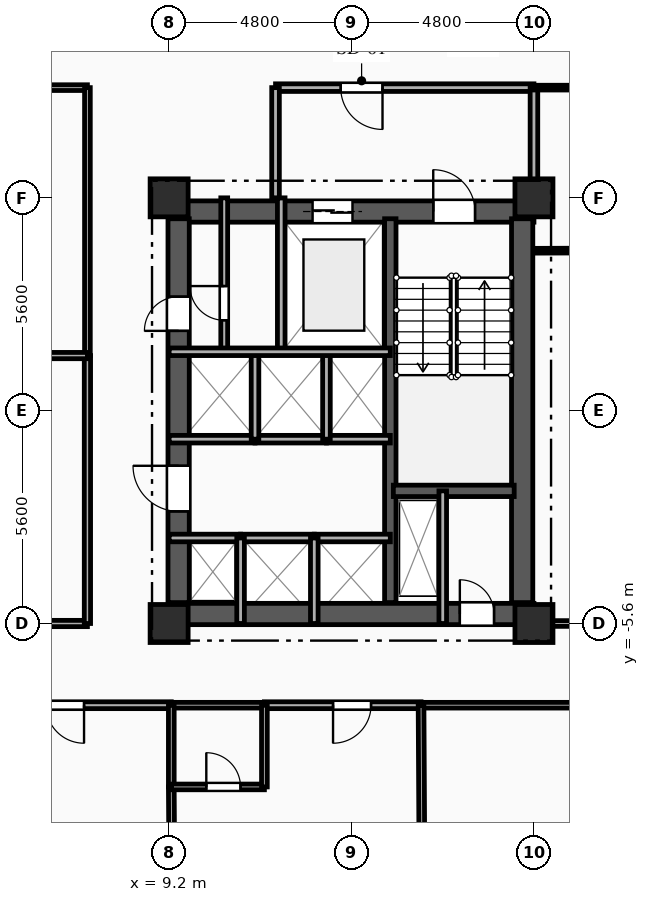
"""IFC4 building model, lengths in metres.
Left out: names, types, materials, properties, quantities, classifications, styles, units other than length and angle.
Written with IfcOpenShell. Run it as: python <this file> out.ifc"""

import sys

from ifc_helpers import new_model, si_unit, direction, frame, frame_2d, origin, origin_2d, place, context, subcontext, project, spatial, rectangle, extrude, element, fill, save


model = new_model("IFC4")
c1 = context("Model", 3, precision=1e-05, world=origin(), true_north=direction((0.0, 1.0)))
c2 = subcontext(c1, "Body", "Model", "MODEL_VIEW")
j1 = project(units=[si_unit("LENGTHUNIT", "METRE"), si_unit("PLANEANGLEUNIT", "RADIAN")], contexts=[c1])
p1 = place(None, origin())
s1 = spatial("IfcSite", under=j1, at=p1, CompositionType="ELEMENT")
p2 = place(p1, origin())
s2 = spatial("IfcBuilding", under=s1, at=p2, CompositionType="ELEMENT")
p3 = place(p2, frame((0.0, 0.0, 119.2)))
s3 = spatial("IfcBuildingStorey", under=s2, at=p3, CompositionType="ELEMENT", Elevation=119.2)
for number, where, z_axis, x_axis in (
    (1, (9.2, -5.6, 0.0), (0.0, 0.0, 1.0), (1.0, 0.0, 0.0)),
    (2, (9.2, 5.6, 0.0), (0.0, 0.0, 1.0), (1.0, 0.0, 0.0)),
    (3, (18.8, -5.6, 0.0), (0.0, 0.0, 1.0), (1.0, 0.0, 0.0)),
    (4, (18.8, 5.6, 0.0), (0.0, 0.0, 1.0), (1.0, 0.0, 0.0)),
):
    element("IfcColumn", number, at=place(p3, frame(where, z_axis=z_axis, x_axis=x_axis)), inside=s3, PredefinedType="COLUMN", context=c2, shape_type="SweptSolid", body=[
        extrude(rectangle(XDim=1.0, YDim=1.0, at=origin_2d()), origin(), (0.0, 0.0, 1.0), 3.35),
    ])
p4 = place(p3, frame((9.2, 5.24, 0.0), z_axis=(0.0, 0.0, 1.0), x_axis=(1.0, 0.0, 0.0)))
e5 = element("IfcWall", 5, at=p4, inside=s3, PredefinedType="SHEAR", context=c2, shape_type="SweptSolid", body=[
    extrude(rectangle(XDim=9.6, YDim=0.56, at=frame_2d((4.8, 0.0))), origin(), (0.0, 0.0, 1.0), 3.045),
])
p5 = place(p4, frame((6.95, 0.0, 0.0)))
e6 = element("IfcOpeningElement", 6, at=p5, cuts=e5, PredefinedType="OPENING", context=c2, shape_type="SweptSolid", body=[
    extrude(rectangle(XDim=1.1, YDim=2.15, at=frame_2d((0.55, 1.075))), frame((0.0, 0.29, 0.0), z_axis=(0.0, -1.0, 0.0), x_axis=(1.0, 0.0, 0.0)), (0.0, 0.0, 1.0), 0.58),
])
p6 = place(p4, frame((3.775, 0.0, 0.0)))
e7 = element("IfcOpeningElement", 7, at=p6, cuts=e5, PredefinedType="OPENING", context=c2, shape_type="SweptSolid", body=[
    extrude(rectangle(XDim=1.05, YDim=2.1, at=frame_2d((0.525, 1.05))), frame((0.0, 0.29, 0.0), z_axis=(0.0, -1.0, 0.0), x_axis=(1.0, 0.0, 0.0)), (0.0, 0.0, 1.0), 0.58),
])
p7 = place(p3, frame((9.2, -5.35, 0.0), z_axis=(0.0, 0.0, 1.0), x_axis=(1.0, 0.0, 0.0)))
e8 = element("IfcWall", 8, at=p7, inside=s3, PredefinedType="SHEAR", context=c2, shape_type="SweptSolid", body=[
    extrude(rectangle(XDim=9.6, YDim=0.56, at=frame_2d((4.8, 0.0))), origin(), (0.0, 0.0, 1.0), 3.045),
])
p8 = place(p7, frame((7.65, 0.0, 0.0)))
e9 = element("IfcOpeningElement", 9, at=p8, cuts=e8, PredefinedType="OPENING", context=c2, shape_type="SweptSolid", body=[
    extrude(rectangle(XDim=0.9, YDim=2.1, at=frame_2d((0.45, 1.05))), frame((0.0, 0.29, 0.0), z_axis=(0.0, -1.0, 0.0), x_axis=(1.0, 0.0, 0.0)), (0.0, 0.0, 1.0), 0.58),
])
p9 = place(p3, frame((9.45, -5.05, 0.0), z_axis=(0.0, 0.0, 1.0), x_axis=(0.0, 1.0, 0.0)))
e10 = element("IfcWall", 10, at=p9, inside=s3, PredefinedType="SHEAR", context=c2, shape_type="SweptSolid", body=[
    extrude(rectangle(XDim=10.1, YDim=0.56, at=frame_2d((5.05, 0.0))), origin(), (0.0, 0.0, 1.0), 3.045),
])
p10 = place(p9, frame((7.15, 0.0, 0.0)))
e11 = element("IfcOpeningElement", 11, at=p10, cuts=e10, PredefinedType="OPENING", context=c2, shape_type="SweptSolid", body=[
    extrude(rectangle(XDim=0.9, YDim=2.1, at=frame_2d((0.45, 1.05))), frame((0.0, 0.29, 0.0), z_axis=(0.0, -1.0, 0.0), x_axis=(1.0, 0.0, 0.0)), (0.0, 0.0, 1.0), 0.58),
])
p11 = place(p9, frame((2.4, 0.0, 0.0)))
e12 = element("IfcOpeningElement", 12, at=p11, cuts=e10, PredefinedType="OPENING", context=c2, shape_type="SweptSolid", body=[
    extrude(rectangle(XDim=1.2, YDim=2.15, at=frame_2d((0.6, 1.075))), frame((0.0, 0.29, 0.0), z_axis=(0.0, -1.0, 0.0), x_axis=(1.0, 0.0, 0.0)), (0.0, 0.0, 1.0), 0.58),
])
p12 = place(p3, frame((18.49, -5.05, 0.0), z_axis=(0.0, 0.0, 1.0), x_axis=(0.0, 1.0, 0.0)))
e13 = element("IfcWall", 13, at=p12, inside=s3, PredefinedType="SHEAR", context=c2, shape_type="SweptSolid", body=[
    extrude(rectangle(XDim=10.1, YDim=0.56, at=frame_2d((5.05, 0.0))), origin(), (0.0, 0.0, 1.0), 3.045),
])
p13 = place(p3, frame((15.02, -5.05, 0.0), z_axis=(0.0, 0.0, 1.0), x_axis=(0.0, 1.0, 0.0)))
e14 = element("IfcWall", 14, at=p13, inside=s3, PredefinedType="SHEAR", context=c2, shape_type="SweptSolid", body=[
    extrude(rectangle(XDim=10.1, YDim=0.3, at=frame_2d((5.05, 0.0))), origin(), (0.0, 0.0, 1.0), 3.045),
])
p14 = place(p3, frame((15.1, -2.11, 0.0), z_axis=(0.0, 0.0, 1.0), x_axis=(1.0, 0.0, 0.0)))
e15 = element("IfcWall", 15, at=p14, inside=s3, PredefinedType="SHEAR", context=c2, shape_type="SweptSolid", body=[
    extrude(rectangle(XDim=3.18, YDim=0.3, at=frame_2d((1.59, 0.0))), origin(), (0.0, 0.0, 1.0), 3.045),
])
p15 = place(p3, frame((16.4, -2.11, 0.0), z_axis=(0.0, 0.0, 1.0), x_axis=(0.0, -1.0, 0.0)))
e16 = element("IfcWall", 16, at=p15, inside=s3, PredefinedType="PARTITIONING", context=c2, shape_type="SweptSolid", body=[
    extrude(rectangle(XDim=3.49, YDim=0.2, at=frame_2d((1.745, 0.0))), origin(), (0.0, 0.0, 1.0), 3.045),
])
p16 = place(p3, frame((12.15, 5.6, 0.0), z_axis=(0.0, 0.0, 1.0), x_axis=(0.0, -1.0, 0.0)))
e17 = element("IfcWall", 17, at=p16, inside=s3, PredefinedType="PARTITIONING", context=c2, shape_type="SweptSolid", body=[
    extrude(rectangle(XDim=4.05, YDim=0.2, at=frame_2d((2.025, 0.0))), origin(), (0.0, 0.0, 1.0), 3.045),
])
p17 = place(p3, frame((18.8, 8.5, 0.0), z_axis=(0.0, 0.0, 1.0), x_axis=(-1.0, 0.0, 0.0)))
e18 = element("IfcWall", 18, at=p17, inside=s3, PredefinedType="PARTITIONING", context=c2, shape_type="SweptSolid", body=[
    extrude(rectangle(XDim=6.8, YDim=0.2, at=frame_2d((3.4, 0.0))), origin(), (0.0, 0.0, 1.0), 3.045),
])
p18 = place(p17, frame((3.985, 0.0, 0.0)))
e19 = element("IfcOpeningElement", 19, at=p18, cuts=e18, PredefinedType="OPENING", context=c2, shape_type="SweptSolid", body=[
    extrude(rectangle(XDim=1.1, YDim=2.15, at=frame_2d((0.55, 1.075))), frame((0.0, 0.11, 0.0), z_axis=(0.0, -1.0, 0.0), x_axis=(1.0, 0.0, 0.0)), (0.0, 0.0, 1.0), 0.22),
])
p19 = place(p3, frame((12.0, 8.5, 0.0), z_axis=(0.0, 0.0, 1.0), x_axis=(0.0, -1.0, 0.0)))
e20 = element("IfcWall", 20, at=p19, inside=s3, PredefinedType="PARTITIONING", context=c2, shape_type="SweptSolid", body=[
    extrude(rectangle(XDim=2.9, YDim=0.2, at=frame_2d((1.45, 0.0))), origin(), (0.0, 0.0, 1.0), 3.045),
])
p20 = place(p3, frame((18.8, 5.6, 0.0), z_axis=(0.0, 0.0, 1.0), x_axis=(0.0, 1.0, 0.0)))
e21 = element("IfcWall", 21, at=p20, inside=s3, PredefinedType="PARTITIONING", context=c2, shape_type="SweptSolid", body=[
    extrude(rectangle(XDim=2.9, YDim=0.2, at=frame_2d((1.45, 0.0))), origin(), (0.0, 0.0, 1.0), 2.53),
])
p21 = place(p3, frame((10.65, 1.55, 0.0), z_axis=(0.0, 0.0, 1.0), x_axis=(0.0, 1.0, 0.0)))
e22 = element("IfcWall", 22, at=p21, inside=s3, PredefinedType="PARTITIONING", context=c2, shape_type="SweptSolid", body=[
    extrude(rectangle(XDim=4.05, YDim=0.18, at=frame_2d((2.025, 0.0))), origin(), (0.0, 0.0, 1.0), 3.045),
])
p22 = place(p21, frame((0.829, 0.0, 0.0)))
e23 = element("IfcOpeningElement", 23, at=p22, cuts=e22, PredefinedType="OPENING", context=c2, shape_type="SweptSolid", body=[
    extrude(rectangle(XDim=0.9, YDim=2.1, at=frame_2d((0.45, 1.05))), frame((0.0, 0.1, 0.0), z_axis=(0.0, -1.0, 0.0), x_axis=(1.0, 0.0, 0.0)), (0.0, 0.0, 1.0), 0.2),
])
p23 = place(p3, frame((9.2, -3.35, 0.0), z_axis=(0.0, 0.0, 1.0), x_axis=(1.0, 0.0, 0.0)))
e24 = element("IfcWall", 24, at=p23, inside=s3, PredefinedType="PARTITIONING", context=c2, shape_type="SweptSolid", body=[
    extrude(rectangle(XDim=1.88, YDim=0.2, at=frame_2d((0.94, 0.0))), origin(), (0.0, 0.0, 1.0), 2.76),
])
p24 = place(p3, frame((11.08, -3.35, 0.0), z_axis=(0.0, 0.0, 1.0), x_axis=(1.0, 0.0, 0.0)))
e25 = element("IfcWall", 25, at=p24, inside=s3, PredefinedType="PARTITIONING", context=c2, shape_type="SweptSolid", body=[
    extrude(rectangle(XDim=1.94, YDim=0.2, at=frame_2d((0.97, 0.0))), origin(), (0.0, 0.0, 1.0), 3.045),
])
p25 = place(p3, frame((13.02, -3.35, 0.0), z_axis=(0.0, 0.0, 1.0), x_axis=(1.0, 0.0, 0.0)))
e26 = element("IfcWall", 26, at=p25, inside=s3, PredefinedType="PARTITIONING", context=c2, shape_type="SweptSolid", body=[
    extrude(rectangle(XDim=2.0, YDim=0.2, at=frame_2d((1.0, 0.0))), origin(), (0.0, 0.0, 1.0), 3.045),
])
p26 = place(p3, frame((11.46, -0.75, 0.0), z_axis=(0.0, 0.0, 1.0), x_axis=(-1.0, 0.0, 0.0)))
e27 = element("IfcWall", 27, at=p26, inside=s3, PredefinedType="PARTITIONING", context=c2, shape_type="SweptSolid", body=[
    extrude(rectangle(XDim=2.26, YDim=0.2, at=frame_2d((1.13, 0.0))), origin(), (0.0, 0.0, 1.0), 3.045),
])
p27 = place(p3, frame((13.34, -0.75, 0.0), z_axis=(0.0, 0.0, 1.0), x_axis=(-1.0, 0.0, 0.0)))
e28 = element("IfcWall", 28, at=p27, inside=s3, PredefinedType="PARTITIONING", context=c2, shape_type="SweptSolid", body=[
    extrude(rectangle(XDim=1.88, YDim=0.2, at=frame_2d((0.94, 0.0))), origin(), (0.0, 0.0, 1.0), 3.045),
])
p28 = place(p3, frame((15.02, -0.75, 0.0), z_axis=(0.0, 0.0, 1.0), x_axis=(-1.0, 0.0, 0.0)))
e29 = element("IfcWall", 29, at=p28, inside=s3, PredefinedType="PARTITIONING", context=c2, shape_type="SweptSolid", body=[
    extrude(rectangle(XDim=1.68, YDim=0.2, at=frame_2d((0.84, 0.0))), origin(), (0.0, 0.0, 1.0), 3.045),
])
for number, where, z_axis, x_axis in (
    (30, (11.08, -5.6, 0.0), (0.0, 0.0, 1.0), (0.0, 1.0, 0.0)),
    (31, (13.02, -5.6, 0.0), (0.0, 0.0, 1.0), (0.0, 1.0, 0.0)),
):
    element("IfcWall", number, at=place(p3, frame(where, z_axis=z_axis, x_axis=x_axis)), inside=s3, PredefinedType="PARTITIONING", context=c2, shape_type="SweptSolid", body=[
        extrude(rectangle(XDim=2.25, YDim=0.2, at=frame_2d((1.125, 0.0))), origin(), (0.0, 0.0, 1.0), 3.045),
    ])
for number, where, z_axis, x_axis in (
    (32, (11.46, -0.75, 0.0), (0.0, 0.0, 1.0), (0.0, 1.0, 0.0)),
    (33, (13.34, -0.75, 0.0), (0.0, 0.0, 1.0), (0.0, 1.0, 0.0)),
):
    element("IfcWall", number, at=place(p3, frame(where, z_axis=z_axis, x_axis=x_axis)), inside=s3, PredefinedType="PARTITIONING", context=c2, shape_type="SweptSolid", body=[
        extrude(rectangle(XDim=2.3, YDim=0.2, at=frame_2d((1.15, 0.0))), origin(), (0.0, 0.0, 1.0), 3.045),
    ])
p29 = place(p3, frame((23.0, 8.5, 0.0), z_axis=(0.0, 0.0, 1.0), x_axis=(-1.0, 0.0, 0.0)))
e34 = element("IfcWall", 34, at=p29, inside=s3, PredefinedType="PARTITIONING", context=c2, shape_type="SweptSolid", body=[
    extrude(rectangle(XDim=4.2, YDim=0.125, at=frame_2d((2.1, 0.0))), origin(), (0.0, 0.0, 1.0), 3.045),
])
p30 = place(p29, frame((0.841, 0.0, 0.0)))
e35 = element("IfcOpeningElement", 35, at=p30, cuts=e34, PredefinedType="OPENING", context=c2, shape_type="SweptSolid", body=[
    extrude(rectangle(XDim=0.95, YDim=2.1, at=frame_2d((0.475, 1.05))), frame((0.0, 0.073, 0.0), z_axis=(0.0, -1.0, 0.0), x_axis=(1.0, 0.0, 0.0)), (0.0, 0.0, 1.0), 0.145),
])
p31 = place(p3, frame((7.05, 8.5, 0.0), z_axis=(0.0, 0.0, 1.0), x_axis=(-1.0, 0.0, 0.0)))
e36 = element("IfcWall", 36, at=p31, inside=s3, PredefinedType="PARTITIONING", context=c2, shape_type="SweptSolid", body=[
    extrude(rectangle(XDim=7.05, YDim=0.15, at=frame_2d((3.525, 0.0))), origin(), (0.0, 0.0, 1.0), 3.045),
])
p32 = place(p3, frame((18.8, -5.6, 0.0), z_axis=(0.0, 0.0, 1.0), x_axis=(1.0, 0.0, 0.0)))
e37 = element("IfcWall", 37, at=p32, inside=s3, PredefinedType="PARTITIONING", context=c2, shape_type="SweptSolid", body=[
    extrude(rectangle(XDim=4.2, YDim=0.15, at=frame_2d((2.1, 0.0))), origin(), (0.0, 0.0, 1.0), 2.53),
])
p33 = place(p32, frame((2.321, 0.0, 0.0)))
e38 = element("IfcOpeningElement", 38, at=p33, cuts=e37, PredefinedType="OPENING", context=c2, shape_type="SweptSolid", body=[
    extrude(rectangle(XDim=1.05, YDim=2.15, at=frame_2d((0.525, 1.075))), frame((0.0, 0.085, 0.0), z_axis=(0.0, -1.0, 0.0), x_axis=(1.0, 0.0, 0.0)), (0.0, 0.0, 1.0), 0.17),
])
p34 = place(p3, frame((9.257, -7.75, 0.0), z_axis=(0.0, 0.0, 1.0), x_axis=(-1.0, 0.0, 0.0)))
e39 = element("IfcWall", 39, at=p34, inside=s3, PredefinedType="PARTITIONING", context=c2, shape_type="SweptSolid", body=[
    extrude(rectangle(XDim=4.121, YDim=0.18, at=frame_2d((2.061, 0.0))), origin(), (0.0, 0.0, 1.0), 3.045),
])
p35 = place(p34, frame((2.296, 0.0, 0.0)))
e40 = element("IfcOpeningElement", 40, at=p35, cuts=e39, PredefinedType="OPENING", context=c2, shape_type="SweptSolid", body=[
    extrude(rectangle(XDim=1.0, YDim=2.15, at=frame_2d((0.5, 1.075))), frame((0.0, 0.1, 0.0), z_axis=(0.0, -1.0, 0.0), x_axis=(1.0, 0.0, 0.0)), (0.0, 0.0, 1.0), 0.2),
])
p36 = place(p3, frame((15.829, -7.75, 0.0), z_axis=(0.0, 0.0, 1.0), x_axis=(-1.0, 0.0, 0.0)))
e41 = element("IfcWall", 41, at=p36, inside=s3, PredefinedType="PARTITIONING", context=c2, shape_type="SweptSolid", body=[
    extrude(rectangle(XDim=4.122, YDim=0.18, at=frame_2d((2.061, 0.0))), origin(), (0.0, 0.0, 1.0), 3.045),
])
p37 = place(p36, frame((1.316, 0.0, 0.0)))
e42 = element("IfcOpeningElement", 42, at=p37, cuts=e41, PredefinedType="OPENING", context=c2, shape_type="SweptSolid", body=[
    extrude(rectangle(XDim=1.0, YDim=2.15, at=frame_2d((0.5, 1.075))), frame((0.0, 0.1, 0.0), z_axis=(0.0, -1.0, 0.0), x_axis=(1.0, 0.0, 0.0)), (0.0, 0.0, 1.0), 0.2),
])
p38 = place(p3, frame((11.707, -7.75, 0.0), z_axis=(0.0, 0.0, 1.0), x_axis=(-1.0, 0.0, 0.0)))
e43 = element("IfcWall", 43, at=p38, inside=s3, PredefinedType="PLUMBINGWALL", context=c2, shape_type="SweptSolid", body=[
    extrude(rectangle(XDim=2.45, YDim=0.15, at=frame_2d((1.225, 0.0))), origin(), (0.0, 0.0, 1.0), 3.045),
])
p39 = place(p3, frame((23.0, -7.75, 0.0), z_axis=(0.0, 0.0, 1.0), x_axis=(-1.0, 0.0, 0.0)))
e44 = element("IfcWall", 44, at=p39, inside=s3, PredefinedType="PARTITIONING", context=c2, shape_type="SweptSolid", body=[
    extrude(rectangle(XDim=7.171, YDim=0.15, at=frame_2d((3.585, 0.0))), origin(), (0.0, 0.0, 1.0), 3.045),
])
p40 = place(p39, frame((1.2, 0.0, 0.0)))
e45 = element("IfcOpeningElement", 45, at=p40, cuts=e44, PredefinedType="OPENING", context=c2, shape_type="SweptSolid", body=[
    extrude(rectangle(XDim=1.05, YDim=2.15, at=frame_2d((0.525, 1.075))), frame((0.0, 0.085, 0.0), z_axis=(0.0, -1.0, 0.0), x_axis=(1.0, 0.0, 0.0)), (0.0, 0.0, 1.0), 0.17),
])
p41 = place(p3, frame((0.0, -5.6, 0.0), z_axis=(0.0, 0.0, 1.0), x_axis=(1.0, 0.0, 0.0)))
e46 = element("IfcWall", 46, at=p41, inside=s3, PredefinedType="PARTITIONING", context=c2, shape_type="SweptSolid", body=[
    extrude(rectangle(XDim=7.05, YDim=0.165, at=frame_2d((3.525, 0.0))), origin(), (0.0, 0.0, 1.0), 2.53),
])
p42 = place(p3, frame((7.05, -5.6, 0.0), z_axis=(0.0, 0.0, 1.0), x_axis=(0.0, 1.0, 0.0)))
e47 = element("IfcWall", 47, at=p42, inside=s3, PredefinedType="PARTITIONING", context=c2, shape_type="SweptSolid", body=[
    extrude(rectangle(XDim=7.05, YDim=0.165, at=frame_2d((3.525, 0.0))), origin(), (0.0, 0.0, 1.0), 3.045),
])
p43 = place(p3, frame((7.05, 1.45, 0.0), z_axis=(0.0, 0.0, 1.0), x_axis=(0.0, 1.0, 0.0)))
e48 = element("IfcWall", 48, at=p43, inside=s3, PredefinedType="PARTITIONING", context=c2, shape_type="SweptSolid", body=[
    extrude(rectangle(XDim=7.05, YDim=0.15, at=frame_2d((3.525, 0.0))), origin(), (0.0, 0.0, 1.0), 3.045),
])
p44 = place(p3, frame((18.8, 4.208, 0.0), z_axis=(0.0, 0.0, 1.0), x_axis=(0.9999942944, 0.003378042094, 0.0)))
e49 = element("IfcWall", 49, at=p44, inside=s3, PredefinedType="PARTITIONING", context=c2, shape_type="SweptSolid", body=[
    extrude(rectangle(XDim=13.009, YDim=0.125, at=frame_2d((6.504, 0.0))), origin(), (0.0, 0.0, 1.0), 3.045),
])
p45 = place(p3, frame((9.257, -9.9, 0.0), z_axis=(0.0, 0.0, 1.0), x_axis=(0.006943468909, -0.999975893829, 0.0)))
e50 = element("IfcWall", 50, at=p45, inside=s3, PredefinedType="PARTITIONING", context=c2, shape_type="SweptSolid", body=[
    extrude(rectangle(XDim=6.294, YDim=0.15, at=frame_2d((3.147, 0.0))), origin(), (0.0, 0.0, 1.0), 3.045),
])
p46 = place(p3, frame((9.257, -7.75, 0.0), z_axis=(0.0, 0.0, 1.0), x_axis=(0.0, -1.0, 0.0)))
e51 = element("IfcWall", 51, at=p46, inside=s3, PredefinedType="PLUMBINGWALL", context=c2, shape_type="SweptSolid", body=[
    extrude(rectangle(XDim=2.15, YDim=0.15, at=frame_2d((1.075, 0.0))), origin(), (0.0, 0.0, 1.0), 3.045),
])
p47 = place(p3, frame((9.257, -9.9, 0.0), z_axis=(0.0, 0.0, 1.0), x_axis=(1.0, 0.0, 0.0)))
e52 = element("IfcWall", 52, at=p47, inside=s3, PredefinedType="PLUMBINGWALL", context=c2, shape_type="SweptSolid", body=[
    extrude(rectangle(XDim=2.45, YDim=0.15, at=frame_2d((1.225, 0.0))), origin(), (0.0, 0.0, 1.0), 3.045),
])
p48 = place(p47, frame((0.921, 0.0, 0.0)))
e53 = element("IfcOpeningElement", 53, at=p48, cuts=e52, PredefinedType="OPENING", context=c2, shape_type="SweptSolid", body=[
    extrude(rectangle(XDim=0.9, YDim=2.1, at=frame_2d((0.45, 1.05))), frame((0.0, 0.085, 0.0), z_axis=(0.0, -1.0, 0.0), x_axis=(1.0, 0.0, 0.0)), (0.0, 0.0, 1.0), 0.17),
])
p49 = place(p3, frame((11.707, -9.9, 0.0), z_axis=(0.0, 0.0, 1.0), x_axis=(0.0, 1.0, 0.0)))
e54 = element("IfcWall", 54, at=p49, inside=s3, PredefinedType="PLUMBINGWALL", context=c2, shape_type="SweptSolid", body=[
    extrude(rectangle(XDim=2.15, YDim=0.15, at=frame_2d((1.075, 0.0))), origin(), (0.0, 0.0, 1.0), 3.045),
])
p50 = place(p3, frame((15.829, -7.75, 0.0), z_axis=(0.0, 0.0, 1.0), x_axis=(0.00563681802, -0.999984113015, 0.0)))
e55 = element("IfcWall", 55, at=p50, inside=s3, PredefinedType="PARTITIONING", context=c2, shape_type="SweptSolid", body=[
    extrude(rectangle(XDim=7.753, YDim=0.15, at=frame_2d((3.876, 0.0))), origin(), (0.0, 0.0, 1.0), 3.045),
])
p51 = place(p3, frame((-7.05, 1.45, 0.0), z_axis=(0.0, 0.0, 1.0), x_axis=(1.0, 0.0, 0.0)))
e56 = element("IfcWall", 56, at=p51, inside=s3, PredefinedType="PARTITIONING", context=c2, shape_type="SweptSolid", body=[
    extrude(rectangle(XDim=14.1, YDim=0.165, at=frame_2d((7.05, 0.0))), origin(), (0.0, 0.0, 1.0), 3.045),
])
p52 = place(p3, frame((9.2, 1.55, 0.0), z_axis=(0.0, 0.0, 1.0), x_axis=(1.0, 0.0, 0.0)))
e57 = element("IfcWall", 57, at=p52, inside=s3, PredefinedType="PARTITIONING", context=c2, shape_type="SweptSolid", body=[
    extrude(rectangle(XDim=5.82, YDim=0.2, at=frame_2d((2.91, 0.0))), origin(), (0.0, 0.0, 1.0), 3.045),
])
p53 = place(p5, origin())
e58 = element("IfcDoor", 58, at=p53, inside=s3, OperationType="SINGLE_SWING_LEFT", PredefinedType="DOOR", context=c2, shape_type="SweptSolid", body=[
    extrude(rectangle(XDim=1.1, YDim=2.15, at=frame_2d((0.55, 1.075))), frame((0.0, 0.025, 0.0), z_axis=(0.0, -1.0, 0.0), x_axis=(1.0, 0.0, 0.0)), (0.0, 0.0, 1.0), 0.05),
])
fill(e6, e58)
p54 = place(p6, origin())
e59 = element("IfcDoor", 59, at=p54, inside=s3, OperationType="DOUBLE_DOOR_SLIDING", PredefinedType="DOOR", context=c2, shape_type="SweptSolid", body=[
    extrude(rectangle(XDim=1.05, YDim=2.1, at=frame_2d((0.525, 1.05))), frame((0.0, 0.025, 0.0), z_axis=(0.0, -1.0, 0.0), x_axis=(1.0, 0.0, 0.0)), (0.0, 0.0, 1.0), 0.05),
])
fill(e7, e59)
p55 = place(p8, origin())
e60 = element("IfcDoor", 60, at=p55, inside=s3, OperationType="SINGLE_SWING_LEFT", PredefinedType="DOOR", context=c2, shape_type="SweptSolid", body=[
    extrude(rectangle(XDim=0.9, YDim=2.1, at=frame_2d((0.45, 1.05))), frame((0.0, 0.025, 0.0), z_axis=(0.0, -1.0, 0.0), x_axis=(1.0, 0.0, 0.0)), (0.0, 0.0, 1.0), 0.05),
])
fill(e9, e60)
p56 = place(p18, origin())
e61 = element("IfcDoor", 61, at=p56, inside=s3, OperationType="SINGLE_SWING_LEFT", PredefinedType="DOOR", context=c2, shape_type="SweptSolid", body=[
    extrude(rectangle(XDim=1.1, YDim=2.15, at=frame_2d((0.55, 1.075))), frame((0.0, 0.025, 0.0), z_axis=(0.0, -1.0, 0.0), x_axis=(1.0, 0.0, 0.0)), (0.0, 0.0, 1.0), 0.05),
])
fill(e19, e61)
p57 = place(p22, origin())
e62 = element("IfcDoor", 62, at=p57, inside=s3, OperationType="SINGLE_SWING_RIGHT", PredefinedType="DOOR", context=c2, shape_type="SweptSolid", body=[
    extrude(rectangle(XDim=0.9, YDim=2.1, at=frame_2d((0.45, 1.05))), frame((0.0, 0.025, 0.0), z_axis=(0.0, -1.0, 0.0), x_axis=(1.0, 0.0, 0.0)), (0.0, 0.0, 1.0), 0.05),
])
fill(e23, e62)
p58 = place(p10, origin())
e63 = element("IfcDoor", 63, at=p58, inside=s3, OperationType="SINGLE_SWING_LEFT", PredefinedType="DOOR", context=c2, shape_type="SweptSolid", body=[
    extrude(rectangle(XDim=0.9, YDim=2.1, at=frame_2d((0.45, 1.05))), frame((0.0, 0.025, 0.0), z_axis=(0.0, -1.0, 0.0), x_axis=(1.0, 0.0, 0.0)), (0.0, 0.0, 1.0), 0.05),
])
fill(e11, e63)
p59 = place(p11, origin())
e64 = element("IfcDoor", 64, at=p59, inside=s3, OperationType="SINGLE_SWING_RIGHT", PredefinedType="DOOR", context=c2, shape_type="SweptSolid", body=[
    extrude(rectangle(XDim=1.2, YDim=2.15, at=frame_2d((0.6, 1.075))), frame((0.0, 0.025, 0.0), z_axis=(0.0, -1.0, 0.0), x_axis=(1.0, 0.0, 0.0)), (0.0, 0.0, 1.0), 0.05),
])
fill(e12, e64)
p60 = place(p35, origin())
e65 = element("IfcDoor", 65, at=p60, inside=s3, OperationType="SINGLE_SWING_LEFT", PredefinedType="DOOR", context=c2, shape_type="SweptSolid", body=[
    extrude(rectangle(XDim=1.0, YDim=2.15, at=frame_2d((0.5, 1.075))), frame((0.0, 0.025, 0.0), z_axis=(0.0, -1.0, 0.0), x_axis=(1.0, 0.0, 0.0)), (0.0, 0.0, 1.0), 0.05),
])
fill(e40, e65)
p61 = place(p37, origin())
e66 = element("IfcDoor", 66, at=p61, inside=s3, OperationType="SINGLE_SWING_RIGHT", PredefinedType="DOOR", context=c2, shape_type="SweptSolid", body=[
    extrude(rectangle(XDim=1.0, YDim=2.15, at=frame_2d((0.5, 1.075))), frame((0.0, 0.025, 0.0), z_axis=(0.0, -1.0, 0.0), x_axis=(1.0, 0.0, 0.0)), (0.0, 0.0, 1.0), 0.05),
])
fill(e42, e66)
p62 = place(p48, origin())
e67 = element("IfcDoor", 67, at=p62, inside=s3, OperationType="SINGLE_SWING_LEFT", PredefinedType="DOOR", context=c2, shape_type="SweptSolid", body=[
    extrude(rectangle(XDim=0.9, YDim=2.1, at=frame_2d((0.45, 1.05))), frame((0.0, 0.025, 0.0), z_axis=(0.0, -1.0, 0.0), x_axis=(1.0, 0.0, 0.0)), (0.0, 0.0, 1.0), 0.05),
])
fill(e53, e67)
save(model, sys.argv[1])
